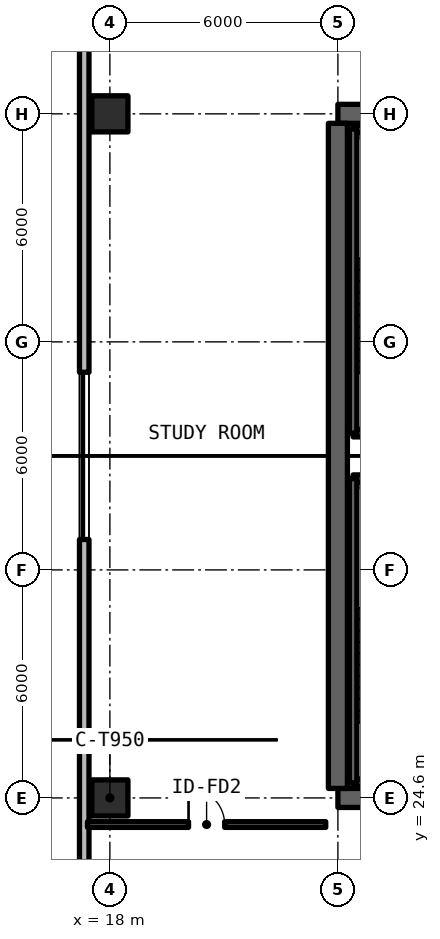
"""IFC4 building model, lengths in metres.
Left out: names, types, materials, properties, quantities, classifications, styles, units other than length and angle.
Written with IfcOpenShell. Run it as: python <this file> out.ifc"""

import sys

from ifc_helpers import new_model, si_unit, direction, frame, frame_2d, origin, origin_2d, place, context, subcontext, project, spatial, rectangle, extrude, element, fill, save


model = new_model("IFC4")
c1 = context("Model", 3, precision=1e-05, world=origin(), true_north=direction((0.0, 1.0)))
c2 = subcontext(c1, "Body", "Model", "MODEL_VIEW")
j1 = project(units=[si_unit("LENGTHUNIT", "METRE"), si_unit("PLANEANGLEUNIT", "RADIAN")], contexts=[c1])
p1 = place(None, origin())
s1 = spatial("IfcSite", under=j1, at=p1, CompositionType="ELEMENT")
p2 = place(p1, origin())
s2 = spatial("IfcBuilding", under=s1, at=p2, CompositionType="ELEMENT")
p3 = place(p2, frame((0.0, 0.0, 112.2)))
s3 = spatial("IfcBuildingStorey", under=s2, at=p3, CompositionType="ELEMENT", Elevation=112.2)
for number, where, z_axis, x_axis in (
    (1, (24.0, 24.6, 0.0), (0.0, 0.0, 1.0), (1.0, 0.0, 0.0)),
    (2, (36.0, 42.6, 0.0), (0.0, 0.0, 1.0), (-1.0, 0.0, 0.0)),
):
    element("IfcWall", number, at=place(p3, frame(where, z_axis=z_axis, x_axis=x_axis)), inside=s3, PredefinedType="SHEAR", context=c2, shape_type="SweptSolid", body=[
        extrude(rectangle(XDim=12.0, YDim=0.5, at=frame_2d((6.0, 0.0))), origin(), (0.0, 0.0, 1.0), 3.63),
    ])
p4 = place(p3, frame((24.0, 24.85, 0.0), z_axis=(0.0, 0.0, 1.0), x_axis=(0.0, 1.0, 0.0)))
e3 = element("IfcWall", 3, at=p4, inside=s3, PredefinedType="SHEAR", context=c2, shape_type="SweptSolid", body=[
    extrude(rectangle(XDim=17.5, YDim=0.5, at=frame_2d((8.75, 0.0))), origin(), (0.0, 0.0, 1.0), 3.63),
])
for number, where, z_axis, x_axis in (
    (4, (18.0, 24.6, 0.0), (0.0, 0.0, 1.0), (1.0, 0.0, 0.0)),
    (5, (18.0, 42.6, 0.0), (0.0, 0.0, 1.0), (1.0, 0.0, 0.0)),
):
    element("IfcColumn", number, at=place(p3, frame(where, z_axis=z_axis, x_axis=x_axis)), inside=s3, PredefinedType="COLUMN", context=c2, shape_type="SweptSolid", body=[
        extrude(rectangle(XDim=0.95, YDim=0.95, at=origin_2d()), origin(), (0.0, 0.0, 1.0), 3.63),
    ])
p5 = place(p3, frame((17.325, 53.348, 0.0), z_axis=(0.0, 0.0, 1.0), x_axis=(0.0, -1.0, 0.0)))
e6 = element("IfcWall", 6, at=p5, inside=s3, PredefinedType="SOLIDWALL", context=c2, shape_type="SweptSolid", body=[
    extrude(rectangle(XDim=39.496, YDim=0.25, at=frame_2d((19.748, 0.0))), origin(), (0.0, 0.0, 1.0), 3.41),
])
p6 = place(p5, frame((17.548, 0.0, 0.78)))
e7 = element("IfcOpeningElement", 7, at=p6, cuts=e6, PredefinedType="OPENING", context=c2, shape_type="SweptSolid", body=[
    extrude(rectangle(XDim=4.4, YDim=1.66, at=frame_2d((2.2, 0.83))), frame((0.0, 0.135, 0.0), z_axis=(0.0, -1.0, 0.0), x_axis=(1.0, 0.0, 0.0)), (0.0, 0.0, 1.0), 0.27),
])
p7 = place(p5, frame((32.492, 0.0, 0.78)))
e8 = element("IfcOpeningElement", 8, at=p7, cuts=e6, PredefinedType="OPENING", context=c2, shape_type="SweptSolid", body=[
    extrude(rectangle(XDim=1.4, YDim=1.65, at=frame_2d((0.7, 0.825))), frame((0.0, 0.135, 0.0), z_axis=(0.0, -1.0, 0.0), x_axis=(1.0, 0.0, 0.0)), (0.0, 0.0, 1.0), 0.27),
])
p8 = place(p3, frame((17.41, 23.9, 0.0), z_axis=(0.0, 0.0, 1.0), x_axis=(1.0, 0.0, 0.0)))
e9 = element("IfcWall", 9, at=p8, inside=s3, PredefinedType="SOLIDWALL", context=c2, shape_type="SweptSolid", body=[
    extrude(rectangle(XDim=6.27, YDim=0.15, at=frame_2d((3.135, 0.0))), origin(), (0.0, 0.0, 1.0), 2.63),
])
p9 = place(p8, frame((2.66, 0.0, 0.0)))
e10 = element("IfcOpeningElement", 10, at=p9, cuts=e9, PredefinedType="OPENING", context=c2, shape_type="SweptSolid", body=[
    extrude(rectangle(XDim=0.95, YDim=2.15, at=frame_2d((0.475, 1.075))), frame((0.0, 0.085, 0.0), z_axis=(0.0, -1.0, 0.0), x_axis=(1.0, 0.0, 0.0)), (0.0, 0.0, 1.0), 0.17),
])
for number, where, z_axis, x_axis in (
    (11, (24.4, 25.0, 0.0), (0.0, 0.0, 1.0), (1.0, 0.0, 0.0)),
    (12, (27.8, 33.0, 0.0), (0.0, 0.0, 1.0), (-1.0, 0.0, 0.0)),
):
    element("IfcWall", number, at=place(p3, frame(where, z_axis=z_axis, x_axis=x_axis)), inside=s3, PredefinedType="SOLIDWALL", context=c2, shape_type="SweptSolid", body=[
        extrude(rectangle(XDim=3.4, YDim=0.2, at=frame_2d((1.7, 0.0))), origin(), (0.0, 0.0, 1.0), 3.63),
    ])
p10 = place(p3, frame((24.4, 33.0, 0.0), z_axis=(0.0, 0.0, 1.0), x_axis=(0.0, -1.0, 0.0)))
e13 = element("IfcWall", 13, at=p10, inside=s3, PredefinedType="SOLIDWALL", context=c2, shape_type="SweptSolid", body=[
    extrude(rectangle(XDim=8.0, YDim=0.2, at=frame_2d((4.0, 0.0))), origin(), (0.0, 0.0, 1.0), 3.63),
])
for number, where, z_axis, x_axis in (
    (14, (24.4, 34.2, 0.0), (0.0, 0.0, 1.0), (1.0, 0.0, 0.0)),
    (15, (27.8, 42.2, 0.0), (0.0, 0.0, 1.0), (-1.0, 0.0, 0.0)),
):
    element("IfcWall", number, at=place(p3, frame(where, z_axis=z_axis, x_axis=x_axis)), inside=s3, PredefinedType="SOLIDWALL", context=c2, shape_type="SweptSolid", body=[
        extrude(rectangle(XDim=3.4, YDim=0.2, at=frame_2d((1.7, 0.0))), origin(), (0.0, 0.0, 1.0), 3.63),
    ])
p11 = place(p3, frame((24.4, 42.2, 0.0), z_axis=(0.0, 0.0, 1.0), x_axis=(0.0, -1.0, 0.0)))
e16 = element("IfcWall", 16, at=p11, inside=s3, PredefinedType="SOLIDWALL", context=c2, shape_type="SweptSolid", body=[
    extrude(rectangle(XDim=8.0, YDim=0.2, at=frame_2d((4.0, 0.0))), origin(), (0.0, 0.0, 1.0), 3.63),
])
p12 = place(p6, origin())
e17 = element("IfcWindow", 17, at=p12, inside=s3, PartitioningType="SINGLE_PANEL", PredefinedType="WINDOW", context=c2, shape_type="SweptSolid", body=[
    extrude(rectangle(XDim=4.4, YDim=1.66, at=frame_2d((2.2, 0.83))), frame((0.0, 0.03, 0.0), z_axis=(0.0, -1.0, 0.0), x_axis=(1.0, 0.0, 0.0)), (0.0, 0.0, 1.0), 0.06),
])
fill(e7, e17)
p13 = place(p9, origin())
e18 = element("IfcDoor", 18, at=p13, inside=s3, OperationType="SINGLE_SWING_LEFT", PredefinedType="DOOR", context=c2, shape_type="SweptSolid", body=[
    extrude(rectangle(XDim=0.95, YDim=2.15, at=frame_2d((0.475, 1.075))), frame((0.0, 0.025, 0.0), z_axis=(0.0, -1.0, 0.0), x_axis=(1.0, 0.0, 0.0)), (0.0, 0.0, 1.0), 0.05),
])
fill(e10, e18)
save(model, sys.argv[1])
